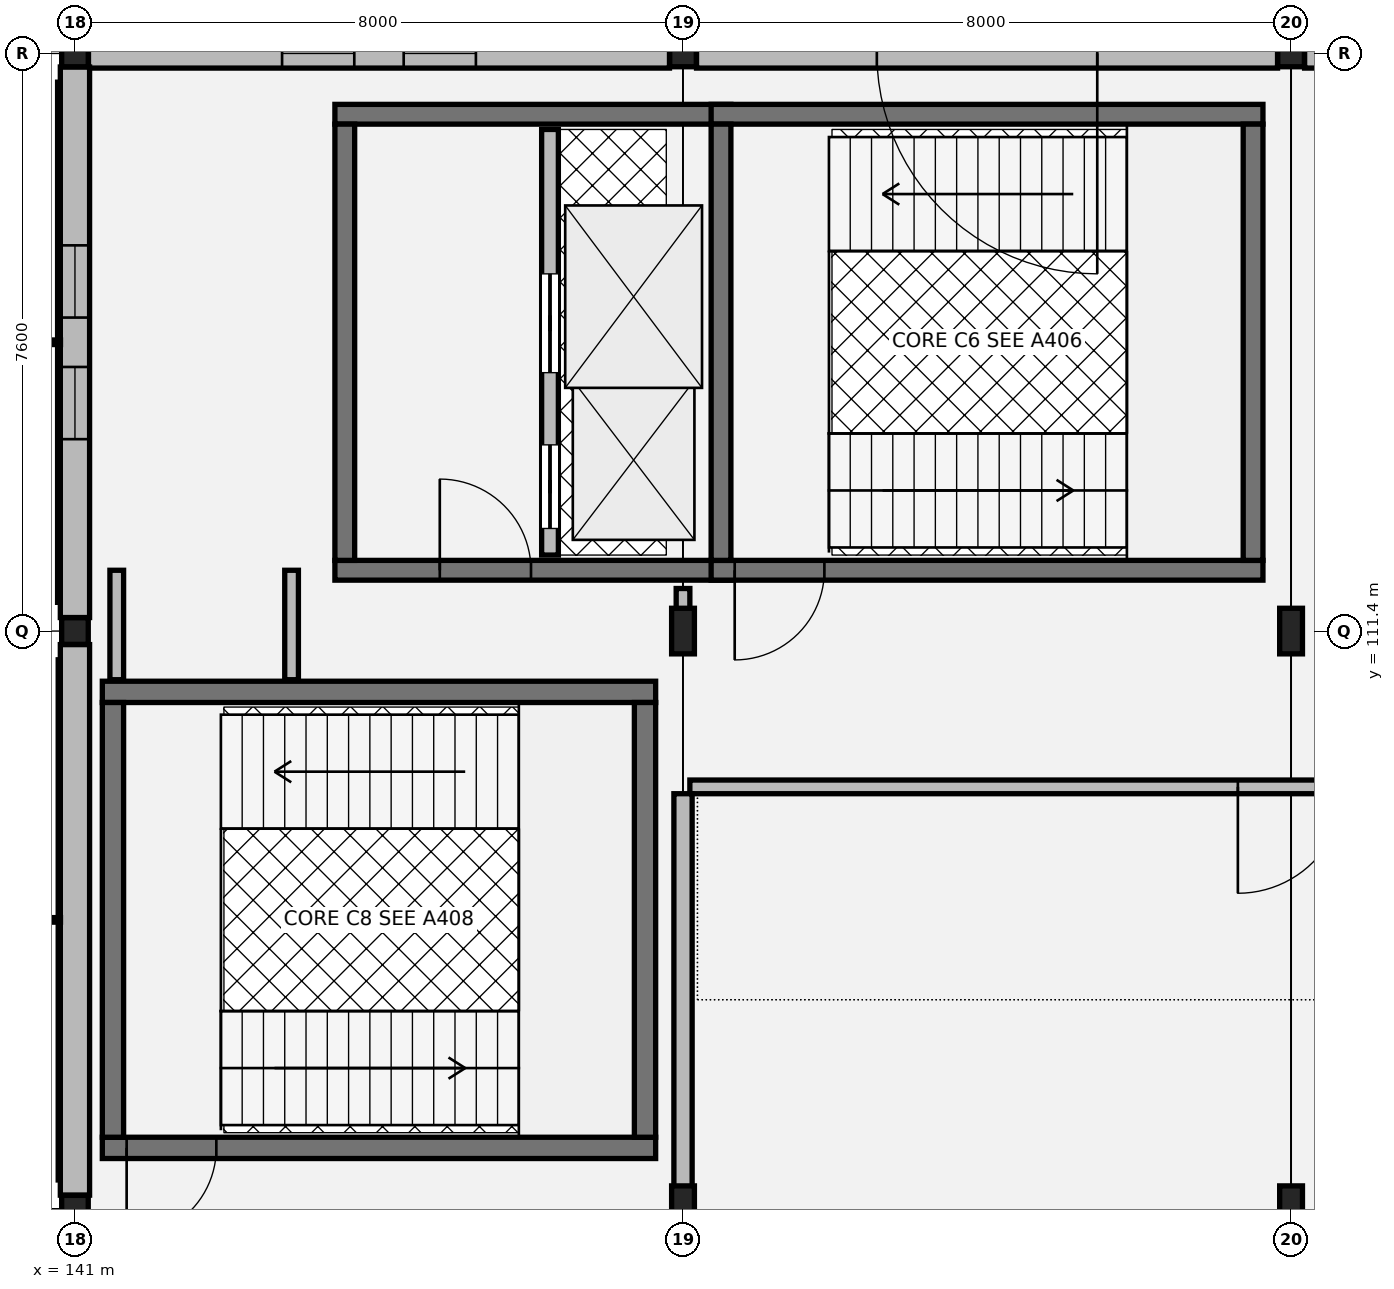
"""IFC4 building model, lengths in metres.
Left out: names, types, materials, properties, quantities, classifications, styles, units other than length and angle.
Written with IfcOpenShell. Run it as: python <this file> out.ifc"""

import sys

from ifc_helpers import new_model, si_unit, direction, frame, frame_2d, origin, origin_2d, place, context, subcontext, project, spatial, rectangle, hollow_rectangle, i_section, extrude, element, fill, save


model = new_model("IFC4")
c1 = context("Model", 3, precision=1e-05, world=origin(), true_north=direction((0.0, 1.0)))
c2 = subcontext(c1, "Body", "Model", "MODEL_VIEW")
j1 = project(units=[si_unit("LENGTHUNIT", "METRE"), si_unit("PLANEANGLEUNIT", "RADIAN")], contexts=[c1])
p1 = place(None, origin())
s1 = spatial("IfcSite", under=j1, at=p1, CompositionType="ELEMENT")
p2 = place(p1, origin())
s2 = spatial("IfcBuilding", under=s1, at=p2, CompositionType="ELEMENT")
p3 = place(p2, origin())
s3 = spatial("IfcBuildingStorey", under=s2, at=p3, CompositionType="ELEMENT", Elevation=0.0)
for number, where, z_axis, x_axis in (
    (1, (141.0, 103.8, 0.0), (0.0, 0.0, 1.0), (1.0, 0.0, 0.0)),
    (2, (141.0, 111.4, 0.0), (0.0, 0.0, 1.0), (1.0, 0.0, 0.0)),
    (3, (141.0, 119.0, 0.0), (0.0, 0.0, 1.0), (1.0, 0.0, 0.0)),
):
    element("IfcColumn", number, at=place(p3, frame(where, z_axis=z_axis, x_axis=x_axis)), inside=s3, PredefinedType="COLUMN", context=c2, shape_type="SweptSolid", body=[
        extrude(hollow_rectangle(XDim=0.35, YDim=0.35, WallThickness=0.014, at=origin_2d()), origin(), (0.0, 0.0, 1.0), 5.075),
    ])
for number, where, z_axis, x_axis in (
    (4, (149.0, 103.8, 0.0), (0.0, 0.0, 1.0), (1.0, 0.0, 0.0)),
    (5, (149.0, 111.4, 0.0), (0.0, 0.0, 1.0), (1.0, 0.0, 0.0)),
):
    element("IfcColumn", number, at=place(p3, frame(where, z_axis=z_axis, x_axis=x_axis)), inside=s3, PredefinedType="COLUMN", context=c2, shape_type="SweptSolid", body=[
        extrude(i_section(OverallWidth=0.3, OverallDepth=0.6, WebThickness=0.015, FlangeThickness=0.03, at=origin_2d()), origin(), (0.0, 0.0, 1.0), 5.075),
    ])
p4 = place(p3, frame((149.0, 119.0, 0.0), z_axis=(0.0, 0.0, 1.0), x_axis=(1.0, 0.0, 0.0)))
e6 = element("IfcColumn", 6, at=p4, inside=s3, PredefinedType="COLUMN", context=c2, shape_type="SweptSolid", body=[
    extrude(hollow_rectangle(XDim=0.35, YDim=0.35, WallThickness=0.014, at=origin_2d()), origin(), (0.0, 0.0, 1.0), 5.075),
])
for number, where, z_axis, x_axis in (
    (7, (157.0, 103.8, 0.0), (0.0, 0.0, 1.0), (1.0, 0.0, 0.0)),
    (8, (157.0, 111.4, 0.0), (0.0, 0.0, 1.0), (1.0, 0.0, 0.0)),
):
    element("IfcColumn", number, at=place(p3, frame(where, z_axis=z_axis, x_axis=x_axis)), inside=s3, PredefinedType="COLUMN", context=c2, shape_type="SweptSolid", body=[
        extrude(i_section(OverallWidth=0.3, OverallDepth=0.6, WebThickness=0.015, FlangeThickness=0.03, at=origin_2d()), origin(), (0.0, 0.0, 1.0), 5.075),
    ])
p5 = place(p3, frame((157.0, 119.0, 0.0), z_axis=(0.0, 0.0, 1.0), x_axis=(1.0, 0.0, 0.0)))
e9 = element("IfcColumn", 9, at=p5, inside=s3, PredefinedType="COLUMN", context=c2, shape_type="SweptSolid", body=[
    extrude(hollow_rectangle(XDim=0.35, YDim=0.35, WallThickness=0.014, at=origin_2d()), origin(), (0.0, 0.0, 1.0), 5.075),
])
p6 = place(p3, frame((164.822, 119.0, 0.0), z_axis=(0.0, 0.0, 1.0), x_axis=(-1.0, 0.0, 0.0)))
e10 = element("IfcWall", 10, at=p6, inside=s3, PredefinedType="SOLIDWALL", context=c2, shape_type="SweptSolid", body=[
    extrude(rectangle(XDim=7.644, YDim=0.385, at=frame_2d((3.822, 0.0))), origin(), (0.0, 0.0, 1.0), 4.5),
])
p7 = place(p6, frame((2.347, 0.0, 0.8)))
e11 = element("IfcOpeningElement", 11, at=p7, cuts=e10, PredefinedType="OPENING", context=c2, shape_type="SweptSolid", body=[
    extrude(rectangle(XDim=1.15, YDim=2.1, at=frame_2d((0.575, 1.05))), frame((0.0, 0.202, 0.0), z_axis=(0.0, -1.0, 0.0), x_axis=(1.0, 0.0, 0.0)), (0.0, 0.0, 1.0), 0.405),
])
p8 = place(p6, frame((4.147, 0.0, 0.8)))
e12 = element("IfcOpeningElement", 12, at=p8, cuts=e10, PredefinedType="OPENING", context=c2, shape_type="SweptSolid", body=[
    extrude(rectangle(XDim=1.15, YDim=2.1, at=frame_2d((0.575, 1.05))), frame((0.0, 0.202, 0.0), z_axis=(0.0, -1.0, 0.0), x_axis=(1.0, 0.0, 0.0)), (0.0, 0.0, 1.0), 0.405),
])
p9 = place(p3, frame((156.822, 119.0, 0.0), z_axis=(0.0, 0.0, 1.0), x_axis=(-1.0, 0.0, 0.0)))
e13 = element("IfcWall", 13, at=p9, inside=s3, PredefinedType="SOLIDWALL", context=c2, shape_type="SweptSolid", body=[
    extrude(rectangle(XDim=7.644, YDim=0.385, at=frame_2d((3.822, 0.0))), origin(), (0.0, 0.0, 1.0), 4.5),
])
p10 = place(p9, frame((2.372, 0.0, 0.0)))
e14 = element("IfcOpeningElement", 14, at=p10, cuts=e13, PredefinedType="OPENING", context=c2, shape_type="SweptSolid", body=[
    extrude(rectangle(XDim=2.9, YDim=2.95, at=frame_2d((1.45, 1.475))), frame((0.0, 0.202, 0.0), z_axis=(0.0, -1.0, 0.0), x_axis=(1.0, 0.0, 0.0)), (0.0, 0.0, 1.0), 0.405),
])
p11 = place(p3, frame((148.822, 119.0, 0.0), z_axis=(0.0, 0.0, 1.0), x_axis=(-1.0, 0.0, 0.0)))
e15 = element("IfcWall", 15, at=p11, inside=s3, PredefinedType="SOLIDWALL", context=c2, shape_type="SweptSolid", body=[
    extrude(rectangle(XDim=7.644, YDim=0.385, at=frame_2d((3.822, 0.0))), origin(), (0.0, 0.0, 1.0), 4.5),
])
p12 = place(p11, frame((2.547, 0.0, 0.8)))
e16 = element("IfcOpeningElement", 16, at=p12, cuts=e15, PredefinedType="OPENING", context=c2, shape_type="SweptSolid", body=[
    extrude(rectangle(XDim=0.95, YDim=2.0, at=frame_2d((0.475, 1.0))), frame((0.0, 0.202, 0.0), z_axis=(0.0, -1.0, 0.0), x_axis=(1.0, 0.0, 0.0)), (0.0, 0.0, 1.0), 0.405),
])
p13 = place(p11, frame((4.147, 0.0, 0.8)))
e17 = element("IfcOpeningElement", 17, at=p13, cuts=e15, PredefinedType="OPENING", context=c2, shape_type="SweptSolid", body=[
    extrude(rectangle(XDim=0.95, YDim=2.0, at=frame_2d((0.475, 1.0))), frame((0.0, 0.202, 0.0), z_axis=(0.0, -1.0, 0.0), x_axis=(1.0, 0.0, 0.0)), (0.0, 0.0, 1.0), 0.405),
])
p14 = place(p3, frame((141.0, 118.822, 0.0), z_axis=(0.0, 0.0, 1.0), x_axis=(0.0, -1.0, 0.0)))
e18 = element("IfcWall", 18, at=p14, inside=s3, PredefinedType="SOLIDWALL", context=c2, shape_type="SweptSolid", body=[
    extrude(rectangle(XDim=7.244, YDim=0.385, at=frame_2d((3.622, 0.0))), origin(), (0.0, 0.0, 1.0), 4.5),
])
p15 = place(p14, frame((2.347, 0.0, 0.8)))
e19 = element("IfcOpeningElement", 19, at=p15, cuts=e18, PredefinedType="OPENING", context=c2, shape_type="SweptSolid", body=[
    extrude(rectangle(XDim=0.95, YDim=2.0, at=frame_2d((0.475, 1.0))), frame((0.0, 0.202, 0.0), z_axis=(0.0, -1.0, 0.0), x_axis=(1.0, 0.0, 0.0)), (0.0, 0.0, 1.0), 0.405),
])
p16 = place(p14, frame((3.947, 0.0, 0.8)))
e20 = element("IfcOpeningElement", 20, at=p16, cuts=e18, PredefinedType="OPENING", context=c2, shape_type="SweptSolid", body=[
    extrude(rectangle(XDim=0.95, YDim=2.0, at=frame_2d((0.475, 1.0))), frame((0.0, 0.202, 0.0), z_axis=(0.0, -1.0, 0.0), x_axis=(1.0, 0.0, 0.0)), (0.0, 0.0, 1.0), 0.405),
])
p17 = place(p3, frame((141.0, 111.222, 0.0), z_axis=(0.0, 0.0, 1.0), x_axis=(0.0, -1.0, 0.0)))
e21 = element("IfcWall", 21, at=p17, inside=s3, PredefinedType="SOLIDWALL", context=c2, shape_type="SweptSolid", body=[
    extrude(rectangle(XDim=7.244, YDim=0.385, at=frame_2d((3.622, 0.0))), origin(), (0.0, 0.0, 1.0), 4.5),
])
p18 = place(p3, frame((144.42, 112.2, 0.0), z_axis=(0.0, 0.0, 1.0), x_axis=(1.0, 0.0, 0.0)))
e22 = element("IfcWall", 22, at=p18, inside=s3, PredefinedType="SHEAR", context=c2, shape_type="SweptSolid", body=[
    extrude(rectangle(XDim=5.21, YDim=0.26, at=frame_2d((2.605, 0.0))), origin(), (0.0, 0.0, 1.0), 4.865),
])
p19 = place(p18, frame((1.38, 0.0, 0.0)))
e23 = element("IfcOpeningElement", 23, at=p19, cuts=e22, PredefinedType="OPENING", context=c2, shape_type="SweptSolid", body=[
    extrude(rectangle(XDim=1.2, YDim=2.16, at=frame_2d((0.6, 1.08))), frame((0.0, 0.14, 0.0), z_axis=(0.0, -1.0, 0.0), x_axis=(1.0, 0.0, 0.0)), (0.0, 0.0, 1.0), 0.28),
])
p20 = place(p3, frame((149.63, 118.2, 0.0), z_axis=(0.0, 0.0, 1.0), x_axis=(-1.0, 0.0, 0.0)))
e24 = element("IfcWall", 24, at=p20, inside=s3, PredefinedType="SHEAR", context=c2, shape_type="SweptSolid", body=[
    extrude(rectangle(XDim=5.21, YDim=0.26, at=frame_2d((2.605, 0.0))), origin(), (0.0, 0.0, 1.0), 4.865),
])
p21 = place(p3, frame((144.55, 118.07, 0.0), z_axis=(0.0, 0.0, 1.0), x_axis=(0.0, -1.0, 0.0)))
e25 = element("IfcWall", 25, at=p21, inside=s3, PredefinedType="SHEAR", context=c2, shape_type="SweptSolid", body=[
    extrude(rectangle(XDim=5.74, YDim=0.26, at=frame_2d((2.87, 0.0))), origin(), (0.0, 0.0, 1.0), 4.865),
])
p22 = place(p3, frame((147.25, 112.4, 0.0), z_axis=(0.0, 0.0, 1.0), x_axis=(0.0, 1.0, 0.0)))
e26 = element("IfcWall", 26, at=p22, inside=s3, PredefinedType="SOLIDWALL", context=c2, shape_type="SweptSolid", body=[
    extrude(rectangle(XDim=5.6, YDim=0.22, at=frame_2d((2.8, 0.0))), origin(), (0.0, 0.0, 1.0), 4.865),
])
p23 = place(p22, frame((0.35, 0.0, 0.0)))
e27 = element("IfcOpeningElement", 27, at=p23, cuts=e26, PredefinedType="OPENING", context=c2, shape_type="SweptSolid", body=[
    extrude(rectangle(XDim=1.1, YDim=2.15, at=frame_2d((0.55, 1.075))), frame((0.0, 0.12, 0.0), z_axis=(0.0, -1.0, 0.0), x_axis=(1.0, 0.0, 0.0)), (0.0, 0.0, 1.0), 0.24),
])
p24 = place(p22, frame((2.4, 0.0, 0.0)))
e28 = element("IfcOpeningElement", 28, at=p24, cuts=e26, PredefinedType="OPENING", context=c2, shape_type="SweptSolid", body=[
    extrude(rectangle(XDim=1.3, YDim=2.18, at=frame_2d((0.65, 1.09))), frame((0.0, 0.12, 0.0), z_axis=(0.0, -1.0, 0.0), x_axis=(1.0, 0.0, 0.0)), (0.0, 0.0, 1.0), 0.24),
])
p25 = place(p3, frame((149.37, 112.2, 0.0), z_axis=(0.0, 0.0, 1.0), x_axis=(1.0, 0.0, 0.0)))
e29 = element("IfcWall", 29, at=p25, inside=s3, PredefinedType="SHEAR", context=c2, shape_type="SweptSolid", body=[
    extrude(rectangle(XDim=7.26, YDim=0.26, at=frame_2d((3.63, 0.0))), origin(), (0.0, 0.0, 1.0), 4.865),
])
p26 = place(p25, frame((0.31, 0.0, 0.0)))
e30 = element("IfcOpeningElement", 30, at=p26, cuts=e29, PredefinedType="OPENING", context=c2, shape_type="SweptSolid", body=[
    extrude(rectangle(XDim=1.18, YDim=2.18, at=frame_2d((0.59, 1.09))), frame((0.0, 0.14, 0.0), z_axis=(0.0, -1.0, 0.0), x_axis=(1.0, 0.0, 0.0)), (0.0, 0.0, 1.0), 0.28),
])
p27 = place(p3, frame((149.37, 118.2, 0.0), z_axis=(0.0, 0.0, 1.0), x_axis=(1.0, 0.0, 0.0)))
e31 = element("IfcWall", 31, at=p27, inside=s3, PredefinedType="SHEAR", context=c2, shape_type="SweptSolid", body=[
    extrude(rectangle(XDim=7.26, YDim=0.26, at=frame_2d((3.63, 0.0))), origin(), (0.0, 0.0, 1.0), 4.865),
])
for number, where, z_axis, x_axis in (
    (32, (149.5, 112.33, 0.0), (0.0, 0.0, 1.0), (0.0, 1.0, 0.0)),
    (33, (156.5, 112.33, 0.0), (0.0, 0.0, 1.0), (0.0, 1.0, 0.0)),
):
    element("IfcWall", number, at=place(p3, frame(where, z_axis=z_axis, x_axis=x_axis)), inside=s3, PredefinedType="SHEAR", context=c2, shape_type="SweptSolid", body=[
        extrude(rectangle(XDim=5.74, YDim=0.26, at=frame_2d((2.87, 0.0))), origin(), (0.0, 0.0, 1.0), 4.865),
    ])
p28 = place(p3, frame((141.36, 104.6, 0.0), z_axis=(0.0, 0.0, 1.0), x_axis=(1.0, 0.0, 0.0)))
e34 = element("IfcWall", 34, at=p28, inside=s3, PredefinedType="SHEAR", context=c2, shape_type="SweptSolid", body=[
    extrude(rectangle(XDim=7.28, YDim=0.28, at=frame_2d((3.64, 0.0))), origin(), (0.0, 0.0, 1.0), 4.865),
])
p29 = place(p28, frame((0.32, 0.0, 0.0)))
e35 = element("IfcOpeningElement", 35, at=p29, cuts=e34, PredefinedType="OPENING", context=c2, shape_type="SweptSolid", body=[
    extrude(rectangle(XDim=1.18, YDim=2.18, at=frame_2d((0.59, 1.09))), frame((0.0, 0.15, 0.0), z_axis=(0.0, -1.0, 0.0), x_axis=(1.0, 0.0, 0.0)), (0.0, 0.0, 1.0), 0.3),
])
p30 = place(p3, frame((141.36, 110.6, 0.0), z_axis=(0.0, 0.0, 1.0), x_axis=(1.0, 0.0, 0.0)))
e36 = element("IfcWall", 36, at=p30, inside=s3, PredefinedType="SHEAR", context=c2, shape_type="SweptSolid", body=[
    extrude(rectangle(XDim=7.28, YDim=0.28, at=frame_2d((3.64, 0.0))), origin(), (0.0, 0.0, 1.0), 4.865),
])
for number, where, z_axis, x_axis in (
    (37, (141.5, 104.74, 0.0), (0.0, 0.0, 1.0), (0.0, 1.0, 0.0)),
    (38, (148.5, 104.74, 0.0), (0.0, 0.0, 1.0), (0.0, 1.0, 0.0)),
):
    element("IfcWall", number, at=place(p3, frame(where, z_axis=z_axis, x_axis=x_axis)), inside=s3, PredefinedType="SHEAR", context=c2, shape_type="SweptSolid", body=[
        extrude(rectangle(XDim=5.72, YDim=0.28, at=frame_2d((2.86, 0.0))), origin(), (0.0, 0.0, 1.0), 4.865),
    ])
p31 = place(p3, frame((149.09, 109.35, 0.0), z_axis=(0.0, 0.0, 1.0), x_axis=(1.0, 0.0, 0.0)))
e39 = element("IfcWall", 39, at=p31, inside=s3, PredefinedType="PARTITIONING", context=c2, shape_type="SweptSolid", body=[
    extrude(rectangle(XDim=15.82, YDim=0.18, at=frame_2d((7.91, 0.0))), origin(), (0.0, 0.0, 1.0), 4.2),
])
p32 = place(p31, frame((7.21, 0.0, 0.0)))
e40 = element("IfcOpeningElement", 40, at=p32, cuts=e39, PredefinedType="OPENING", context=c2, shape_type="SweptSolid", body=[
    extrude(rectangle(XDim=1.4, YDim=2.22, at=frame_2d((0.7, 1.11))), frame((0.0, 0.1, 0.0), z_axis=(0.0, -1.0, 0.0), x_axis=(1.0, 0.0, 0.0)), (0.0, 0.0, 1.0), 0.2),
])
p33 = place(p3, frame((149.0, 111.64, 0.0), z_axis=(0.0, 0.0, 1.0), x_axis=(0.0, 1.0, 0.0)))
e41 = element("IfcWall", 41, at=p33, inside=s3, PredefinedType="PARTITIONING", context=c2, shape_type="SweptSolid", body=[
    extrude(rectangle(XDim=0.32, YDim=0.18, at=frame_2d((0.16, 0.0))), origin(), (0.0, 0.0, 1.0), 4.2),
])
for number, where, z_axis, x_axis in (
    (42, (141.55, 110.76, 0.0), (0.0, 0.0, 1.0), (0.0, 1.0, 0.0)),
    (43, (143.85, 110.76, 0.0), (0.0, 0.0, 1.0), (0.0, 1.0, 0.0)),
):
    element("IfcWall", number, at=place(p3, frame(where, z_axis=z_axis, x_axis=x_axis)), inside=s3, PredefinedType="PARTITIONING", context=c2, shape_type="SweptSolid", body=[
        extrude(rectangle(XDim=1.44, YDim=0.18, at=frame_2d((0.72, 0.0))), origin(), (0.0, 0.0, 1.0), 4.2),
    ])
p34 = place(p3, frame((149.0, 73.72, 0.0), z_axis=(0.0, 0.0, 1.0), x_axis=(0.0, 1.0, 0.0)))
e44 = element("IfcWall", 44, at=p34, inside=s3, PredefinedType="SOLIDWALL", context=c2, shape_type="SweptSolid", body=[
    extrude(rectangle(XDim=35.54, YDim=0.24, at=frame_2d((17.77, 0.0))), origin(), (0.0, 0.0, 1.0), 4.2),
])
p35 = place(p34, frame((17.12, 0.0, 0.0)))
e45 = element("IfcOpeningElement", 45, at=p35, cuts=e44, PredefinedType="OPENING", context=c2, shape_type="SweptSolid", body=[
    extrude(rectangle(XDim=1.3, YDim=2.2, at=frame_2d((0.65, 1.1))), frame((0.0, 0.13, 0.0), z_axis=(0.0, -1.0, 0.0), x_axis=(1.0, 0.0, 0.0)), (0.0, 0.0, 1.0), 0.26),
])
p36 = place(p10, origin())
e46 = element("IfcDoor", 46, at=p36, inside=s3, OperationType="DOUBLE_DOOR_SINGLE_SWING", PredefinedType="GATE", context=c2, shape_type="SweptSolid", body=[
    extrude(rectangle(XDim=2.9, YDim=2.95, at=frame_2d((1.45, 1.475))), frame((0.0, 0.025, 0.0), z_axis=(0.0, -1.0, 0.0), x_axis=(1.0, 0.0, 0.0)), (0.0, 0.0, 1.0), 0.05),
])
fill(e14, e46)
p37 = place(p12, origin())
e47 = element("IfcWindow", 47, at=p37, inside=s3, PartitioningType="SINGLE_PANEL", PredefinedType="WINDOW", context=c2, shape_type="SweptSolid", body=[
    extrude(rectangle(XDim=0.95, YDim=2.0, at=frame_2d((0.475, 1.0))), frame((0.0, 0.03, 0.0), z_axis=(0.0, -1.0, 0.0), x_axis=(1.0, 0.0, 0.0)), (0.0, 0.0, 1.0), 0.06),
])
fill(e16, e47)
p38 = place(p13, origin())
e48 = element("IfcWindow", 48, at=p38, inside=s3, PartitioningType="SINGLE_PANEL", PredefinedType="WINDOW", context=c2, shape_type="SweptSolid", body=[
    extrude(rectangle(XDim=0.95, YDim=2.0, at=frame_2d((0.475, 1.0))), frame((0.0, 0.03, 0.0), z_axis=(0.0, -1.0, 0.0), x_axis=(1.0, 0.0, 0.0)), (0.0, 0.0, 1.0), 0.06),
])
fill(e17, e48)
p39 = place(p15, origin())
e49 = element("IfcWindow", 49, at=p39, inside=s3, PartitioningType="SINGLE_PANEL", PredefinedType="WINDOW", context=c2, shape_type="SweptSolid", body=[
    extrude(rectangle(XDim=0.95, YDim=2.0, at=frame_2d((0.475, 1.0))), frame((0.0, 0.03, 0.0), z_axis=(0.0, -1.0, 0.0), x_axis=(1.0, 0.0, 0.0)), (0.0, 0.0, 1.0), 0.06),
])
fill(e19, e49)
p40 = place(p16, origin())
e50 = element("IfcWindow", 50, at=p40, inside=s3, PartitioningType="SINGLE_PANEL", PredefinedType="WINDOW", context=c2, shape_type="SweptSolid", body=[
    extrude(rectangle(XDim=0.95, YDim=2.0, at=frame_2d((0.475, 1.0))), frame((0.0, 0.03, 0.0), z_axis=(0.0, -1.0, 0.0), x_axis=(1.0, 0.0, 0.0)), (0.0, 0.0, 1.0), 0.06),
])
fill(e20, e50)
p41 = place(p19, origin())
e51 = element("IfcDoor", 51, at=p41, inside=s3, OperationType="SINGLE_SWING_LEFT", PredefinedType="DOOR", context=c2, shape_type="SweptSolid", body=[
    extrude(rectangle(XDim=1.2, YDim=2.16, at=frame_2d((0.6, 1.08))), frame((0.0, 0.025, 0.0), z_axis=(0.0, -1.0, 0.0), x_axis=(1.0, 0.0, 0.0)), (0.0, 0.0, 1.0), 0.05),
])
fill(e23, e51)
p42 = place(p23, origin())
e52 = element("IfcDoor", 52, at=p42, inside=s3, OperationType="SLIDING_TO_LEFT", PredefinedType="DOOR", context=c2, shape_type="SweptSolid", body=[
    extrude(rectangle(XDim=1.1, YDim=2.15, at=frame_2d((0.55, 1.075))), frame((0.0, 0.025, 0.0), z_axis=(0.0, -1.0, 0.0), x_axis=(1.0, 0.0, 0.0)), (0.0, 0.0, 1.0), 0.05),
])
fill(e27, e52)
p43 = place(p24, origin())
e53 = element("IfcDoor", 53, at=p43, inside=s3, OperationType="SLIDING_TO_LEFT", PredefinedType="DOOR", context=c2, shape_type="SweptSolid", body=[
    extrude(rectangle(XDim=1.3, YDim=2.18, at=frame_2d((0.65, 1.09))), frame((0.0, 0.025, 0.0), z_axis=(0.0, -1.0, 0.0), x_axis=(1.0, 0.0, 0.0)), (0.0, 0.0, 1.0), 0.05),
])
fill(e28, e53)
p44 = place(p26, origin())
e54 = element("IfcDoor", 54, at=p44, inside=s3, OperationType="SINGLE_SWING_RIGHT", PredefinedType="DOOR", context=c2, shape_type="SweptSolid", body=[
    extrude(rectangle(XDim=1.18, YDim=2.18, at=frame_2d((0.59, 1.09))), frame((0.0, 0.025, 0.0), z_axis=(0.0, -1.0, 0.0), x_axis=(1.0, 0.0, 0.0)), (0.0, 0.0, 1.0), 0.05),
])
fill(e30, e54)
p45 = place(p29, origin())
e55 = element("IfcDoor", 55, at=p45, inside=s3, OperationType="SINGLE_SWING_RIGHT", PredefinedType="DOOR", context=c2, shape_type="SweptSolid", body=[
    extrude(rectangle(XDim=1.18, YDim=2.18, at=frame_2d((0.59, 1.09))), frame((0.0, 0.025, 0.0), z_axis=(0.0, -1.0, 0.0), x_axis=(1.0, 0.0, 0.0)), (0.0, 0.0, 1.0), 0.05),
])
fill(e35, e55)
p46 = place(p32, origin())
e56 = element("IfcDoor", 56, at=p46, inside=s3, OperationType="SINGLE_SWING_RIGHT", PredefinedType="DOOR", context=c2, shape_type="SweptSolid", body=[
    extrude(rectangle(XDim=1.4, YDim=2.22, at=frame_2d((0.7, 1.11))), frame((0.0, 0.025, 0.0), z_axis=(0.0, -1.0, 0.0), x_axis=(1.0, 0.0, 0.0)), (0.0, 0.0, 1.0), 0.05),
])
fill(e40, e56)
save(model, sys.argv[1])
